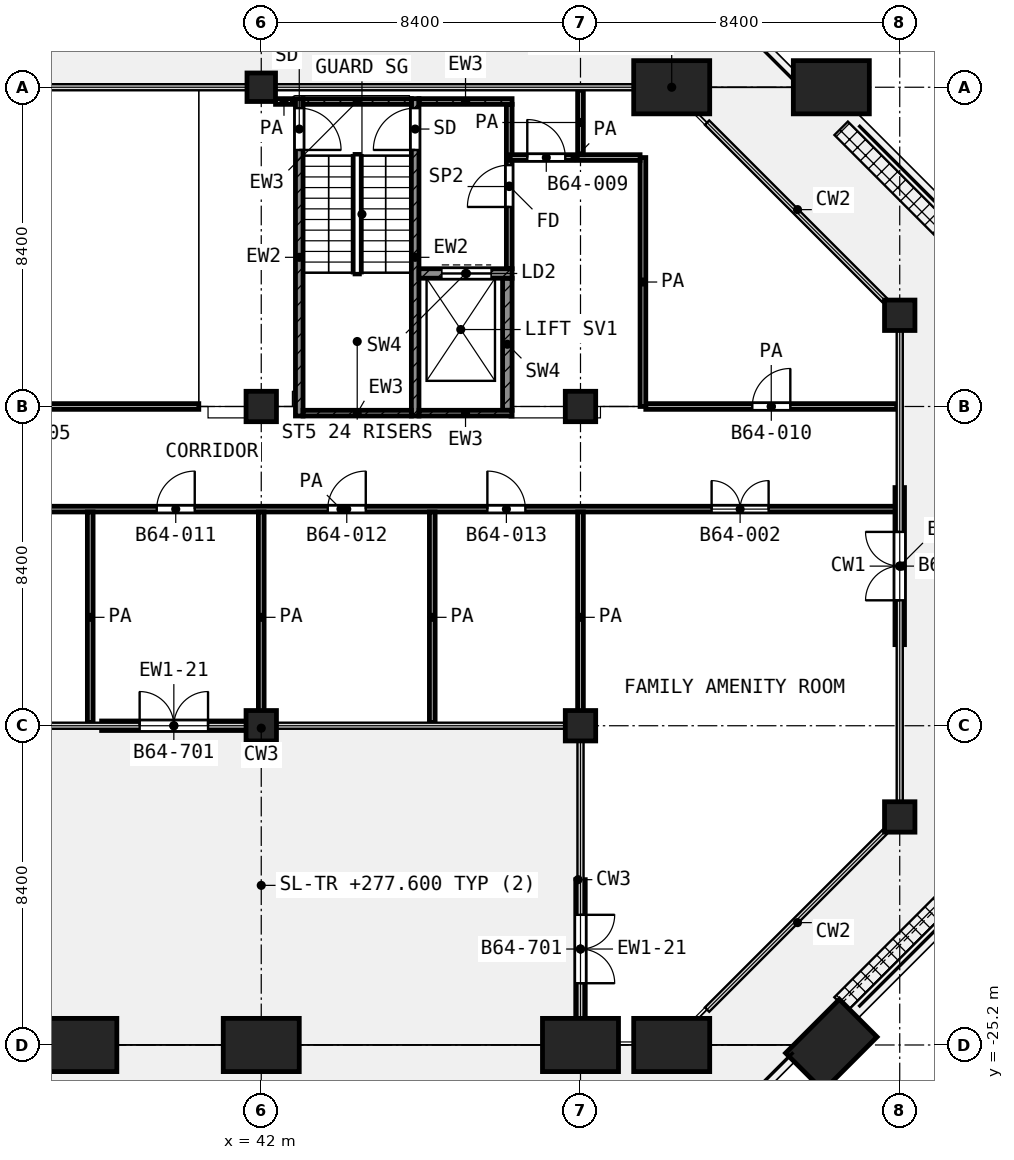
"""IFC4 building model, lengths in metres.
Left out: names, types, materials, properties, quantities, classifications, styles, units other than length and angle.
Written with IfcOpenShell. Run it as: python <this file> out.ifc"""

import sys

from ifc_helpers import new_model, si_unit, direction, frame, frame_2d, origin, origin_2d, place, context, subcontext, project, spatial, rectangle, extrude, element, fill, save


model = new_model("IFC4")
c1 = context("Model", 3, precision=1e-05, world=origin(), true_north=direction((0.0, 1.0)))
c2 = subcontext(c1, "Body", "Model", "MODEL_VIEW")
j1 = project(units=[si_unit("LENGTHUNIT", "METRE"), si_unit("PLANEANGLEUNIT", "RADIAN")], contexts=[c1])
p1 = place(None, origin())
s1 = spatial("IfcSite", under=j1, at=p1, CompositionType="ELEMENT")
p2 = place(p1, origin())
s2 = spatial("IfcBuilding", under=s1, at=p2, CompositionType="ELEMENT")
p3 = place(p2, frame((0.0, 0.0, 277.6)))
s3 = spatial("IfcBuildingStorey", under=s2, at=p3, CompositionType="ELEMENT", Elevation=277.6)
p4 = place(p3, frame((42.0, 0.0, 0.0), z_axis=(0.0, 0.0, 1.0), x_axis=(1.0, 0.0, 0.0)))
e1 = element("IfcColumn", 1, at=p4, inside=s3, PredefinedType="COLUMN", context=c2, shape_type="SweptSolid", body=[
    extrude(rectangle(XDim=0.75, YDim=0.75, at=origin_2d()), origin(), (0.0, 0.0, 1.0), 4.2),
])
p5 = place(p3, frame((52.8, 0.0, 0.0), z_axis=(0.0, 0.0, 1.0), x_axis=(1.0, 0.0, 0.0)))
e2 = element("IfcColumn", 2, at=p5, inside=s3, PredefinedType="COLUMN", context=c2, shape_type="SweptSolid", body=[
    extrude(rectangle(XDim=2.0, YDim=1.4, at=origin_2d()), origin(), (0.0, 0.0, 1.0), 4.2),
])
for number, where, z_axis, x_axis in (
    (3, (58.8, -6.0, 0.0), (0.0, 0.0, 1.0), (1.0, 0.0, 0.0)),
    (4, (42.0, -8.4, 0.0), (0.0, 0.0, 1.0), (1.0, 0.0, 0.0)),
    (5, (50.4, -8.4, 0.0), (0.0, 0.0, 1.0), (1.0, 0.0, 0.0)),
    (6, (42.0, -16.8, 0.0), (0.0, 0.0, 1.0), (1.0, 0.0, 0.0)),
    (7, (50.4, -16.8, 0.0), (0.0, 0.0, 1.0), (1.0, 0.0, 0.0)),
    (8, (58.8, -19.2, 0.0), (0.0, 0.0, 1.0), (1.0, 0.0, 0.0)),
):
    element("IfcColumn", number, at=place(p3, frame(where, z_axis=z_axis, x_axis=x_axis)), inside=s3, PredefinedType="COLUMN", context=c2, shape_type="SweptSolid", body=[
        extrude(rectangle(XDim=0.8, YDim=0.8, at=origin_2d()), origin(), (0.0, 0.0, 1.0), 4.2),
    ])
for number, where, z_axis, x_axis in (
    (9, (42.0, -25.2, 0.0), (0.0, 0.0, 1.0), (-1.0, 0.0, 0.0)),
    (10, (52.8, -25.2, 0.0), (0.0, 0.0, 1.0), (-1.0, 0.0, 0.0)),
    (11, (50.4, -25.2, 0.0), (0.0, 0.0, 1.0), (-1.0, 0.0, 0.0)),
    (12, (37.2, -25.2, 0.0), (0.0, 0.0, 1.0), (-1.0, 0.0, 0.0)),
    (13, (57.0, 0.0, 0.0), (0.0, 0.0, 1.0), (1.0, 0.0, 0.0)),
    (14, (57.0, -25.2, 0.0), (0.0, 0.0, 1.0), (-0.707, -0.707, 0.0)),
):
    element("IfcColumn", number, at=place(p3, frame(where, z_axis=z_axis, x_axis=x_axis)), inside=s3, PredefinedType="COLUMN", context=c2, shape_type="SweptSolid", body=[
        extrude(rectangle(XDim=2.0, YDim=1.4, at=origin_2d()), origin(), (0.0, 0.0, 1.0), 4.2),
    ])
p6 = place(p3, frame((37.8, -16.8, 0.0), z_axis=(0.0, 0.0, 1.0), x_axis=(1.0, 0.0, 0.0)))
e15 = element("IfcWall", 15, at=p6, inside=s3, PredefinedType="SOLIDWALL", context=c2, shape_type="SweptSolid", body=[
    extrude(rectangle(XDim=3.8, YDim=0.25, at=frame_2d((1.9, 0.0))), origin(), (0.0, 0.0, 1.0), 3.46),
])
p7 = place(p6, frame((1.0, 0.0, 0.0)))
e16 = element("IfcOpeningElement", 16, at=p7, cuts=e15, PredefinedType="OPENING", context=c2, shape_type="SweptSolid", body=[
    extrude(rectangle(XDim=1.8, YDim=2.1, at=frame_2d((0.9, 1.05))), frame((0.0, 0.135, 0.0), z_axis=(0.0, -1.0, 0.0), x_axis=(1.0, 0.0, 0.0)), (0.0, 0.0, 1.0), 0.27),
])
p8 = place(p3, frame((50.4, -20.85, 0.0), z_axis=(0.0, 0.0, 1.0), x_axis=(0.0, -1.0, 0.0)))
e17 = element("IfcWall", 17, at=p8, inside=s3, PredefinedType="SOLIDWALL", context=c2, shape_type="SweptSolid", body=[
    extrude(rectangle(XDim=3.65, YDim=0.25, at=frame_2d((1.825, 0.0))), origin(), (0.0, 0.0, 1.0), 3.46),
])
p9 = place(p8, frame((0.925, 0.0, 0.0)))
e18 = element("IfcOpeningElement", 18, at=p9, cuts=e17, PredefinedType="OPENING", context=c2, shape_type="SweptSolid", body=[
    extrude(rectangle(XDim=1.8, YDim=2.1, at=frame_2d((0.9, 1.05))), frame((0.0, 0.135, 0.0), z_axis=(0.0, -1.0, 0.0), x_axis=(1.0, 0.0, 0.0)), (0.0, 0.0, 1.0), 0.27),
])
p10 = place(p3, frame((58.8, -14.667, 0.0), z_axis=(0.0, 0.0, 1.0), x_axis=(0.0, 1.0, 0.0)))
e19 = element("IfcWall", 19, at=p10, inside=s3, PredefinedType="SOLIDWALL", context=c2, shape_type="SweptSolid", body=[
    extrude(rectangle(XDim=4.133, YDim=0.25, at=frame_2d((2.067, 0.0))), origin(), (0.0, 0.0, 1.0), 3.48),
])
p11 = place(p10, frame((1.167, 0.0, 0.0)))
e20 = element("IfcOpeningElement", 20, at=p11, cuts=e19, PredefinedType="OPENING", context=c2, shape_type="SweptSolid", body=[
    extrude(rectangle(XDim=1.8, YDim=2.1, at=frame_2d((0.9, 1.05))), frame((0.0, 0.135, 0.0), z_axis=(0.0, -1.0, 0.0), x_axis=(1.0, 0.0, 0.0)), (0.0, 0.0, 1.0), 0.27),
])
p12 = place(p3, frame((43.0, -8.65, 0.0), z_axis=(0.0, 0.0, 1.0), x_axis=(0.0, 1.0, 0.0)))
e21 = element("IfcWall", 21, at=p12, inside=s3, PredefinedType="SHEAR", context=c2, shape_type="SweptSolid", body=[
    extrude(rectangle(XDim=8.35, YDim=0.2, at=frame_2d((4.175, 0.0))), origin(), (0.0, 0.0, 1.0), 3.6),
])
p13 = place(p12, frame((7.0, 0.0, 0.0)))
e22 = element("IfcOpeningElement", 22, at=p13, cuts=e21, PredefinedType="OPENING", context=c2, shape_type="SweptSolid", body=[
    extrude(rectangle(XDim=1.1, YDim=2.1, at=frame_2d((0.55, 1.05))), frame((0.0, 0.11, 0.0), z_axis=(0.0, -1.0, 0.0), x_axis=(1.0, 0.0, 0.0)), (0.0, 0.0, 1.0), 0.22),
])
p14 = place(p3, frame((46.05, -8.65, 0.0), z_axis=(0.0, 0.0, 1.0), x_axis=(0.0, 1.0, 0.0)))
e23 = element("IfcWall", 23, at=p14, inside=s3, PredefinedType="SHEAR", context=c2, shape_type="SweptSolid", body=[
    extrude(rectangle(XDim=8.35, YDim=0.2, at=frame_2d((4.175, 0.0))), origin(), (0.0, 0.0, 1.0), 3.6),
])
p15 = place(p14, frame((7.0, 0.0, 0.0)))
e24 = element("IfcOpeningElement", 24, at=p15, cuts=e23, PredefinedType="OPENING", context=c2, shape_type="SweptSolid", body=[
    extrude(rectangle(XDim=1.1, YDim=2.1, at=frame_2d((0.55, 1.05))), frame((0.0, 0.11, 0.0), z_axis=(0.0, -1.0, 0.0), x_axis=(1.0, 0.0, 0.0)), (0.0, 0.0, 1.0), 0.22),
])
p16 = place(p3, frame((43.1, -0.375, 0.0), z_axis=(0.0, 0.0, 1.0), x_axis=(1.0, 0.0, 0.0)))
e25 = element("IfcWall", 25, at=p16, inside=s3, PredefinedType="SHEAR", context=c2, shape_type="SweptSolid", body=[
    extrude(rectangle(XDim=2.85, YDim=0.15, at=frame_2d((1.425, 0.0))), origin(), (0.0, 0.0, 1.0), 3.6),
])
p17 = place(p3, frame((46.15, -0.375, 0.0), z_axis=(0.0, 0.0, 1.0), x_axis=(1.0, 0.0, 0.0)))
e26 = element("IfcWall", 26, at=p17, inside=s3, PredefinedType="SHEAR", context=c2, shape_type="SweptSolid", body=[
    extrude(rectangle(XDim=2.45, YDim=0.15, at=frame_2d((1.225, 0.0))), origin(), (0.0, 0.0, 1.0), 3.6),
])
p18 = place(p3, frame((43.1, -8.575, 0.0), z_axis=(0.0, 0.0, 1.0), x_axis=(1.0, 0.0, 0.0)))
e27 = element("IfcWall", 27, at=p18, inside=s3, PredefinedType="SHEAR", context=c2, shape_type="SweptSolid", body=[
    extrude(rectangle(XDim=2.85, YDim=0.15, at=frame_2d((1.425, 0.0))), origin(), (0.0, 0.0, 1.0), 3.6),
])
p19 = place(p3, frame((46.15, -8.575, 0.0), z_axis=(0.0, 0.0, 1.0), x_axis=(1.0, 0.0, 0.0)))
e28 = element("IfcWall", 28, at=p19, inside=s3, PredefinedType="SHEAR", context=c2, shape_type="SweptSolid", body=[
    extrude(rectangle(XDim=2.45, YDim=0.15, at=frame_2d((1.225, 0.0))), origin(), (0.0, 0.0, 1.0), 3.6),
])
p20 = place(p3, frame((46.15, -4.9, 0.0), z_axis=(0.0, 0.0, 1.0), x_axis=(1.0, 0.0, 0.0)))
e29 = element("IfcWall", 29, at=p20, inside=s3, PredefinedType="SHEAR", context=c2, shape_type="SweptSolid", body=[
    extrude(rectangle(XDim=2.45, YDim=0.25, at=frame_2d((1.225, 0.0))), origin(), (0.0, 0.0, 1.0), 3.6),
])
p21 = place(p20, frame((0.6, 0.0, 0.0)))
e30 = element("IfcOpeningElement", 30, at=p21, cuts=e29, PredefinedType="OPENING", context=c2, shape_type="SweptSolid", body=[
    extrude(rectangle(XDim=1.3, YDim=2.1, at=frame_2d((0.65, 1.05))), frame((0.0, 0.135, 0.0), z_axis=(0.0, -1.0, 0.0), x_axis=(1.0, 0.0, 0.0)), (0.0, 0.0, 1.0), 0.27),
])
p22 = place(p3, frame((48.475, -8.5, 0.0), z_axis=(0.0, 0.0, 1.0), x_axis=(0.0, 1.0, 0.0)))
e31 = element("IfcWall", 31, at=p22, inside=s3, PredefinedType="SHEAR", context=c2, shape_type="SweptSolid", body=[
    extrude(rectangle(XDim=3.475, YDim=0.25, at=frame_2d((1.738, 0.0))), origin(), (0.0, 0.0, 1.0), 3.6),
])
p23 = place(p3, frame((48.525, -4.775, 0.0), z_axis=(0.0, 0.0, 1.0), x_axis=(0.0, 1.0, 0.0)))
e32 = element("IfcWall", 32, at=p23, inside=s3, PredefinedType="PARTITIONING", context=c2, shape_type="SweptSolid", body=[
    extrude(rectangle(XDim=4.325, YDim=0.15, at=frame_2d((2.163, 0.0))), origin(), (0.0, 0.0, 1.0), 3.6),
])
p24 = place(p23, frame((1.625, 0.0, 0.0)))
e33 = element("IfcOpeningElement", 33, at=p24, cuts=e32, PredefinedType="OPENING", context=c2, shape_type="SweptSolid", body=[
    extrude(rectangle(XDim=1.1, YDim=2.1, at=frame_2d((0.55, 1.05))), frame((0.0, 0.085, 0.0), z_axis=(0.0, -1.0, 0.0), x_axis=(1.0, 0.0, 0.0)), (0.0, 0.0, 1.0), 0.17),
])
p25 = place(p3, frame((29.475, -11.1, 0.0), z_axis=(0.0, 0.0, 1.0), x_axis=(1.0, 0.0, 0.0)))
e34 = element("IfcWall", 34, at=p25, inside=s3, PredefinedType="PARTITIONING", context=c2, shape_type="SweptSolid", body=[
    extrude(rectangle(XDim=29.245, YDim=0.15, at=frame_2d((14.623, 0.0))), origin(), (0.0, 0.0, 1.0), 3.6),
])
p26 = place(p25, frame((3.225, 0.0, 0.0)))
e35 = element("IfcOpeningElement", 35, at=p26, cuts=e34, PredefinedType="OPENING", context=c2, shape_type="SweptSolid", body=[
    extrude(rectangle(XDim=1.5, YDim=2.1, at=frame_2d((0.75, 1.05))), frame((0.0, 0.085, 0.0), z_axis=(0.0, -1.0, 0.0), x_axis=(1.0, 0.0, 0.0)), (0.0, 0.0, 1.0), 0.17),
])
p27 = place(p25, frame((9.775, 0.0, 0.0)))
e36 = element("IfcOpeningElement", 36, at=p27, cuts=e34, PredefinedType="OPENING", context=c2, shape_type="SweptSolid", body=[
    extrude(rectangle(XDim=1.0, YDim=2.1, at=frame_2d((0.5, 1.05))), frame((0.0, 0.085, 0.0), z_axis=(0.0, -1.0, 0.0), x_axis=(1.0, 0.0, 0.0)), (0.0, 0.0, 1.0), 0.17),
])
p28 = place(p25, frame((14.275, 0.0, 0.0)))
e37 = element("IfcOpeningElement", 37, at=p28, cuts=e34, PredefinedType="OPENING", context=c2, shape_type="SweptSolid", body=[
    extrude(rectangle(XDim=1.0, YDim=2.1, at=frame_2d((0.5, 1.05))), frame((0.0, 0.085, 0.0), z_axis=(0.0, -1.0, 0.0), x_axis=(1.0, 0.0, 0.0)), (0.0, 0.0, 1.0), 0.17),
])
p29 = place(p25, frame((18.475, 0.0, 0.0)))
e38 = element("IfcOpeningElement", 38, at=p29, cuts=e34, PredefinedType="OPENING", context=c2, shape_type="SweptSolid", body=[
    extrude(rectangle(XDim=1.0, YDim=2.1, at=frame_2d((0.5, 1.05))), frame((0.0, 0.085, 0.0), z_axis=(0.0, -1.0, 0.0), x_axis=(1.0, 0.0, 0.0)), (0.0, 0.0, 1.0), 0.17),
])
p30 = place(p25, frame((24.375, 0.0, 0.0)))
e39 = element("IfcOpeningElement", 39, at=p30, cuts=e34, PredefinedType="OPENING", context=c2, shape_type="SweptSolid", body=[
    extrude(rectangle(XDim=1.5, YDim=2.1, at=frame_2d((0.75, 1.05))), frame((0.0, 0.085, 0.0), z_axis=(0.0, -1.0, 0.0), x_axis=(1.0, 0.0, 0.0)), (0.0, 0.0, 1.0), 0.17),
])
p31 = place(p3, frame((24.7, -8.4, 0.0), z_axis=(0.0, 0.0, 1.0), x_axis=(1.0, 0.0, 0.0)))
e40 = element("IfcWall", 40, at=p31, inside=s3, PredefinedType="PARTITIONING", context=c2, shape_type="SweptSolid", body=[
    extrude(rectangle(XDim=15.657, YDim=0.15, at=frame_2d((7.829, 0.0))), origin(), (0.0, 0.0, 1.0), 3.6),
])
p32 = place(p31, frame((1.05, 0.0, 0.0)))
e41 = element("IfcOpeningElement", 41, at=p32, cuts=e40, PredefinedType="OPENING", context=c2, shape_type="SweptSolid", body=[
    extrude(rectangle(XDim=1.0, YDim=2.1, at=frame_2d((0.5, 1.05))), frame((0.0, 0.085, 0.0), z_axis=(0.0, -1.0, 0.0), x_axis=(1.0, 0.0, 0.0)), (0.0, 0.0, 1.0), 0.17),
])
p33 = place(p31, frame((9.379, 0.0, 0.0)))
e42 = element("IfcOpeningElement", 42, at=p33, cuts=e40, PredefinedType="OPENING", context=c2, shape_type="SweptSolid", body=[
    extrude(rectangle(XDim=1.5, YDim=2.1, at=frame_2d((0.75, 1.05))), frame((0.0, 0.085, 0.0), z_axis=(0.0, -1.0, 0.0), x_axis=(1.0, 0.0, 0.0)), (0.0, 0.0, 1.0), 0.17),
])
p34 = place(p3, frame((52.118, -8.4, 0.0), z_axis=(0.0, 0.0, 1.0), x_axis=(1.0, 0.0, 0.0)))
e43 = element("IfcWall", 43, at=p34, inside=s3, PredefinedType="PARTITIONING", context=c2, shape_type="SweptSolid", body=[
    extrude(rectangle(XDim=6.602, YDim=0.15, at=frame_2d((3.301, 0.0))), origin(), (0.0, 0.0, 1.0), 3.6),
])
p35 = place(p34, frame((2.803, 0.0, 0.0)))
e44 = element("IfcOpeningElement", 44, at=p35, cuts=e43, PredefinedType="OPENING", context=c2, shape_type="SweptSolid", body=[
    extrude(rectangle(XDim=1.0, YDim=2.1, at=frame_2d((0.5, 1.05))), frame((0.0, 0.085, 0.0), z_axis=(0.0, -1.0, 0.0), x_axis=(1.0, 0.0, 0.0)), (0.0, 0.0, 1.0), 0.17),
])
p36 = place(p3, frame((48.55, -1.85, 0.0), z_axis=(0.0, 0.0, 1.0), x_axis=(1.0, 0.0, 0.0)))
e45 = element("IfcWall", 45, at=p36, inside=s3, PredefinedType="PARTITIONING", context=c2, shape_type="SweptSolid", body=[
    extrude(rectangle(XDim=3.418, YDim=0.15, at=frame_2d((1.709, 0.0))), origin(), (0.0, 0.0, 1.0), 3.6),
])
p37 = place(p36, frame((0.45, 0.0, 0.0)))
e46 = element("IfcOpeningElement", 46, at=p37, cuts=e45, PredefinedType="OPENING", context=c2, shape_type="SweptSolid", body=[
    extrude(rectangle(XDim=1.0, YDim=2.1, at=frame_2d((0.5, 1.05))), frame((0.0, 0.085, 0.0), z_axis=(0.0, -1.0, 0.0), x_axis=(1.0, 0.0, 0.0)), (0.0, 0.0, 1.0), 0.17),
])
p38 = place(p3, frame((42.376, -0.375, 0.0), z_axis=(0.0, 0.0, 1.0), x_axis=(1.0, 0.0, 0.0)))
e47 = element("IfcWall", 47, at=p38, inside=s3, PredefinedType="PARTITIONING", context=c2, shape_type="SweptSolid", body=[
    extrude(rectangle(XDim=0.444, YDim=0.15, at=frame_2d((0.222, 0.0))), origin(), (0.0, 0.0, 1.0), 3.6),
])
for number, where, z_axis, x_axis in (
    (48, (37.5, -16.72, 0.0), (0.0, 0.0, 1.0), (0.0, 1.0, 0.0)),
    (49, (42.0, -16.72, 0.0), (0.0, 0.0, 1.0), (0.0, 1.0, 0.0)),
    (50, (46.5, -16.72, 0.0), (0.0, 0.0, 1.0), (0.0, 1.0, 0.0)),
    (51, (50.4, -16.72, 0.0), (0.0, 0.0, 1.0), (0.0, 1.0, 0.0)),
):
    element("IfcWall", number, at=place(p3, frame(where, z_axis=z_axis, x_axis=x_axis)), inside=s3, PredefinedType="PARTITIONING", context=c2, shape_type="SweptSolid", body=[
        extrude(rectangle(XDim=5.545, YDim=0.15, at=frame_2d((2.772, 0.0))), origin(), (0.0, 0.0, 1.0), 3.6),
    ])
p39 = place(p3, frame((50.4, -1.775, 0.0), z_axis=(0.0, 0.0, 1.0), x_axis=(0.0, 1.0, 0.0)))
e52 = element("IfcWall", 52, at=p39, inside=s3, PredefinedType="PARTITIONING", context=c2, shape_type="SweptSolid", body=[
    extrude(rectangle(XDim=1.695, YDim=0.15, at=frame_2d((0.847, 0.0))), origin(), (0.0, 0.0, 1.0), 3.6),
])
p40 = place(p3, frame((52.043, -8.4, 0.0), z_axis=(0.0, 0.0, 1.0), x_axis=(0.0, 1.0, 0.0)))
e53 = element("IfcWall", 53, at=p40, inside=s3, PredefinedType="PARTITIONING", context=c2, shape_type="SweptSolid", body=[
    extrude(rectangle(XDim=6.55, YDim=0.15, at=frame_2d((3.275, 0.0))), origin(), (0.0, 0.0, 1.0), 3.6),
])
p41 = place(p7, origin())
e54 = element("IfcDoor", 54, at=p41, inside=s3, OperationType="DOUBLE_DOOR_SINGLE_SWING", PredefinedType="DOOR", context=c2, shape_type="SweptSolid", body=[
    extrude(rectangle(XDim=1.8, YDim=2.1, at=frame_2d((0.9, 1.05))), frame((0.0, 0.025, 0.0), z_axis=(0.0, -1.0, 0.0), x_axis=(1.0, 0.0, 0.0)), (0.0, 0.0, 1.0), 0.05),
])
fill(e16, e54)
p42 = place(p9, origin())
e55 = element("IfcDoor", 55, at=p42, inside=s3, OperationType="DOUBLE_DOOR_SINGLE_SWING", PredefinedType="DOOR", context=c2, shape_type="SweptSolid", body=[
    extrude(rectangle(XDim=1.8, YDim=2.1, at=frame_2d((0.9, 1.05))), frame((0.0, 0.025, 0.0), z_axis=(0.0, -1.0, 0.0), x_axis=(1.0, 0.0, 0.0)), (0.0, 0.0, 1.0), 0.05),
])
fill(e18, e55)
p43 = place(p11, origin())
e56 = element("IfcDoor", 56, at=p43, inside=s3, OperationType="DOUBLE_DOOR_SINGLE_SWING", PredefinedType="DOOR", context=c2, shape_type="SweptSolid", body=[
    extrude(rectangle(XDim=1.8, YDim=2.1, at=frame_2d((0.9, 1.05))), frame((0.0, 0.025, 0.0), z_axis=(0.0, -1.0, 0.0), x_axis=(1.0, 0.0, 0.0)), (0.0, 0.0, 1.0), 0.05),
])
fill(e20, e56)
p44 = place(p13, frame((1.1, 0.0, 0.0), z_axis=(0.0, 0.0, 1.0), x_axis=(-1.0, 0.0, 0.0)))
e57 = element("IfcDoor", 57, at=p44, inside=s3, OperationType="SINGLE_SWING_LEFT", PredefinedType="DOOR", context=c2, shape_type="SweptSolid", body=[
    extrude(rectangle(XDim=1.1, YDim=2.1, at=frame_2d((0.55, 1.05))), frame((0.0, 0.025, 0.0), z_axis=(0.0, -1.0, 0.0), x_axis=(1.0, 0.0, 0.0)), (0.0, 0.0, 1.0), 0.05),
])
fill(e22, e57)
p45 = place(p15, origin())
e58 = element("IfcDoor", 58, at=p45, inside=s3, OperationType="SINGLE_SWING_LEFT", PredefinedType="DOOR", context=c2, shape_type="SweptSolid", body=[
    extrude(rectangle(XDim=1.1, YDim=2.1, at=frame_2d((0.55, 1.05))), frame((0.0, 0.025, 0.0), z_axis=(0.0, -1.0, 0.0), x_axis=(1.0, 0.0, 0.0)), (0.0, 0.0, 1.0), 0.05),
])
fill(e24, e58)
p46 = place(p21, origin())
e59 = element("IfcDoor", 59, at=p46, inside=s3, OperationType="DOUBLE_DOOR_SLIDING", PredefinedType="DOOR", context=c2, shape_type="SweptSolid", body=[
    extrude(rectangle(XDim=1.3, YDim=2.1, at=frame_2d((0.65, 1.05))), frame((0.0, 0.025, 0.0), z_axis=(0.0, -1.0, 0.0), x_axis=(1.0, 0.0, 0.0)), (0.0, 0.0, 1.0), 0.05),
])
fill(e30, e59)
p47 = place(p24, origin())
e60 = element("IfcDoor", 60, at=p47, inside=s3, OperationType="SINGLE_SWING_LEFT", PredefinedType="DOOR", context=c2, shape_type="SweptSolid", body=[
    extrude(rectangle(XDim=1.1, YDim=2.1, at=frame_2d((0.55, 1.05))), frame((0.0, 0.025, 0.0), z_axis=(0.0, -1.0, 0.0), x_axis=(1.0, 0.0, 0.0)), (0.0, 0.0, 1.0), 0.05),
])
fill(e33, e60)
p48 = place(p37, origin())
e61 = element("IfcDoor", 61, at=p48, inside=s3, OperationType="SINGLE_SWING_LEFT", PredefinedType="DOOR", context=c2, shape_type="SweptSolid", body=[
    extrude(rectangle(XDim=1.0, YDim=2.1, at=frame_2d((0.5, 1.05))), frame((0.0, 0.025, 0.0), z_axis=(0.0, -1.0, 0.0), x_axis=(1.0, 0.0, 0.0)), (0.0, 0.0, 1.0), 0.05),
])
fill(e46, e61)
p49 = place(p35, origin())
e62 = element("IfcDoor", 62, at=p49, inside=s3, OperationType="SINGLE_SWING_RIGHT", PredefinedType="DOOR", context=c2, shape_type="SweptSolid", body=[
    extrude(rectangle(XDim=1.0, YDim=2.1, at=frame_2d((0.5, 1.05))), frame((0.0, 0.025, 0.0), z_axis=(0.0, -1.0, 0.0), x_axis=(1.0, 0.0, 0.0)), (0.0, 0.0, 1.0), 0.05),
])
fill(e44, e62)
p50 = place(p27, origin())
e63 = element("IfcDoor", 63, at=p50, inside=s3, OperationType="SINGLE_SWING_RIGHT", PredefinedType="DOOR", context=c2, shape_type="SweptSolid", body=[
    extrude(rectangle(XDim=1.0, YDim=2.1, at=frame_2d((0.5, 1.05))), frame((0.0, 0.025, 0.0), z_axis=(0.0, -1.0, 0.0), x_axis=(1.0, 0.0, 0.0)), (0.0, 0.0, 1.0), 0.05),
])
fill(e36, e63)
p51 = place(p28, origin())
e64 = element("IfcDoor", 64, at=p51, inside=s3, OperationType="SINGLE_SWING_RIGHT", PredefinedType="DOOR", context=c2, shape_type="SweptSolid", body=[
    extrude(rectangle(XDim=1.0, YDim=2.1, at=frame_2d((0.5, 1.05))), frame((0.0, 0.025, 0.0), z_axis=(0.0, -1.0, 0.0), x_axis=(1.0, 0.0, 0.0)), (0.0, 0.0, 1.0), 0.05),
])
fill(e37, e64)
p52 = place(p29, origin())
e65 = element("IfcDoor", 65, at=p52, inside=s3, OperationType="SINGLE_SWING_LEFT", PredefinedType="DOOR", context=c2, shape_type="SweptSolid", body=[
    extrude(rectangle(XDim=1.0, YDim=2.1, at=frame_2d((0.5, 1.05))), frame((0.0, 0.025, 0.0), z_axis=(0.0, -1.0, 0.0), x_axis=(1.0, 0.0, 0.0)), (0.0, 0.0, 1.0), 0.05),
])
fill(e38, e65)
p53 = place(p30, origin())
e66 = element("IfcDoor", 66, at=p53, inside=s3, OperationType="DOUBLE_DOOR_SINGLE_SWING", PredefinedType="DOOR", context=c2, shape_type="SweptSolid", body=[
    extrude(rectangle(XDim=1.5, YDim=2.1, at=frame_2d((0.75, 1.05))), frame((0.0, 0.025, 0.0), z_axis=(0.0, -1.0, 0.0), x_axis=(1.0, 0.0, 0.0)), (0.0, 0.0, 1.0), 0.05),
])
fill(e39, e66)
save(model, sys.argv[1])
